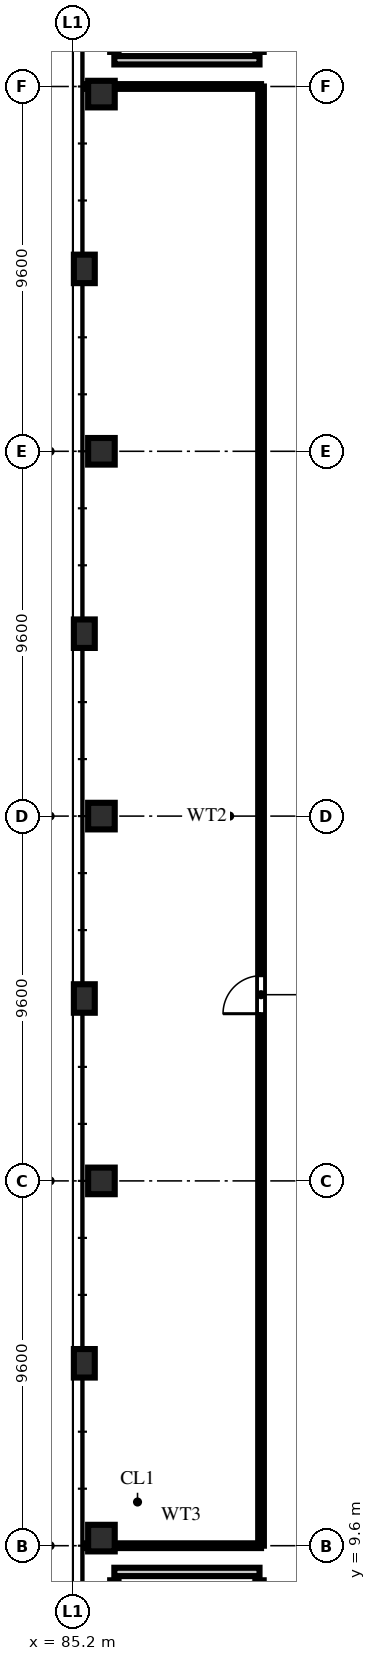
"""IFC4 building model, lengths in metres.
Left out: names, types, materials, properties, quantities, classifications, styles, units other than length and angle.
Written with IfcOpenShell. Run it as: python <this file> out.ifc"""

import sys

from ifc_helpers import new_model, si_unit, direction, frame, frame_2d, origin, origin_2d, place, context, subcontext, project, spatial, rectangle, extrude, element, fill, save


model = new_model("IFC4")
c1 = context("Model", 3, precision=1e-05, world=origin(), true_north=direction((0.0, 1.0)))
c2 = subcontext(c1, "Body", "Model", "MODEL_VIEW")
j1 = project(units=[si_unit("LENGTHUNIT", "METRE"), si_unit("PLANEANGLEUNIT", "RADIAN")], contexts=[c1])
p1 = place(None, origin())
s1 = spatial("IfcSite", under=j1, at=p1, CompositionType="ELEMENT")
p2 = place(p1, origin())
s2 = spatial("IfcBuilding", under=s1, at=p2, CompositionType="ELEMENT")
p3 = place(p2, frame((0.0, 0.0, 5.2)))
s3 = spatial("IfcBuildingStorey", under=s2, at=p3, CompositionType="ELEMENT", Elevation=5.2)
for number, where, z_axis, x_axis in (
    (1, (85.95, 9.8, 0.0), (0.0, 0.0, 1.0), (1.0, 0.0, 0.0)),
    (2, (85.95, 19.2, 0.0), (0.0, 0.0, 1.0), (1.0, 0.0, 0.0)),
    (3, (85.95, 28.8, 0.0), (0.0, 0.0, 1.0), (1.0, 0.0, 0.0)),
    (4, (85.95, 38.4, 0.0), (0.0, 0.0, 1.0), (1.0, 0.0, 0.0)),
    (5, (85.95, 47.8, 0.0), (0.0, 0.0, 1.0), (1.0, 0.0, 0.0)),
):
    element("IfcColumn", number, at=place(p3, frame(where, z_axis=z_axis, x_axis=x_axis)), inside=s3, PredefinedType="COLUMN", context=c2, shape_type="SweptSolid", body=[
        extrude(rectangle(XDim=0.7, YDim=0.7, at=origin_2d()), origin(), (0.0, 0.0, 1.0), 5.2),
    ])
for number, where, z_axis, x_axis in (
    (6, (85.5, 14.4, 0.0), (0.0, 0.0, 1.0), (1.0, 0.0, 0.0)),
    (7, (85.5, 24.0, 0.0), (0.0, 0.0, 1.0), (1.0, 0.0, 0.0)),
    (8, (85.5, 33.6, 0.0), (0.0, 0.0, 1.0), (1.0, 0.0, 0.0)),
    (9, (85.5, 43.2, 0.0), (0.0, 0.0, 1.0), (1.0, 0.0, 0.0)),
):
    element("IfcColumn", number, at=place(p3, frame(where, z_axis=z_axis, x_axis=x_axis)), inside=s3, PredefinedType="PILASTER", context=c2, shape_type="SweptSolid", body=[
        extrude(rectangle(XDim=0.55, YDim=0.75, at=origin_2d()), origin(), (0.0, 0.0, 1.0), 5.2),
    ])
p4 = place(p3, frame((86.29, 1.31, 0.0), z_axis=(0.0, 0.0, 1.0), x_axis=(0.0, 1.0, 0.0)))
e10 = element("IfcWall", 10, at=p4, inside=s3, PredefinedType="SOLIDWALL", context=c2, shape_type="SweptSolid", body=[
    extrude(rectangle(XDim=7.38, YDim=0.22, at=frame_2d((3.69, 0.0))), origin(), (0.0, 0.0, 1.0), 4.85),
])
p5 = place(p3, frame((86.29, 8.91, 0.0), z_axis=(0.0, 0.0, 1.0), x_axis=(1.0, 0.0, 0.0)))
e11 = element("IfcWall", 11, at=p5, inside=s3, PredefinedType="SOLIDWALL", context=c2, shape_type="SweptSolid", body=[
    extrude(rectangle(XDim=3.82, YDim=0.22, at=frame_2d((1.91, 0.0))), origin(), (0.0, 0.0, 1.0), 4.85),
])
p6 = place(p3, frame((90.11, 1.31, 0.0), z_axis=(0.0, 0.0, 1.0), x_axis=(0.0, 1.0, 0.0)))
e12 = element("IfcWall", 12, at=p6, inside=s3, PredefinedType="SOLIDWALL", context=c2, shape_type="SweptSolid", body=[
    extrude(rectangle(XDim=7.38, YDim=0.22, at=frame_2d((3.69, 0.0))), origin(), (0.0, 0.0, 1.0), 4.85),
])
p7 = place(p6, frame((0.14, 0.0, 0.0)))
e13 = element("IfcOpeningElement", 13, at=p7, cuts=e12, PredefinedType="OPENING", context=c2, shape_type="SweptSolid", body=[
    extrude(rectangle(XDim=1.1, YDim=2.2, at=frame_2d((0.55, 1.1))), frame((0.0, 0.122, 0.0), z_axis=(0.0, -1.0, 0.0), x_axis=(1.0, 0.0, 0.0)), (0.0, 0.0, 1.0), 0.244),
])
p8 = place(p3, frame((86.29, 48.91, 0.0), z_axis=(0.0, 0.0, 1.0), x_axis=(0.0, 1.0, 0.0)))
e14 = element("IfcWall", 14, at=p8, inside=s3, PredefinedType="SOLIDWALL", context=c2, shape_type="SweptSolid", body=[
    extrude(rectangle(XDim=7.38, YDim=0.22, at=frame_2d((3.69, 0.0))), origin(), (0.0, 0.0, 1.0), 4.85),
])
p9 = place(p3, frame((86.29, 48.69, 0.0), z_axis=(0.0, 0.0, 1.0), x_axis=(1.0, 0.0, 0.0)))
e15 = element("IfcWall", 15, at=p9, inside=s3, PredefinedType="SOLIDWALL", context=c2, shape_type="SweptSolid", body=[
    extrude(rectangle(XDim=3.82, YDim=0.22, at=frame_2d((1.91, 0.0))), origin(), (0.0, 0.0, 1.0), 4.85),
])
p10 = place(p3, frame((90.11, 48.91, 0.0), z_axis=(0.0, 0.0, 1.0), x_axis=(0.0, 1.0, 0.0)))
e16 = element("IfcWall", 16, at=p10, inside=s3, PredefinedType="SOLIDWALL", context=c2, shape_type="SweptSolid", body=[
    extrude(rectangle(XDim=7.38, YDim=0.22, at=frame_2d((3.69, 0.0))), origin(), (0.0, 0.0, 1.0), 4.85),
])
p11 = place(p10, frame((0.14, 0.0, 0.0)))
e17 = element("IfcOpeningElement", 17, at=p11, cuts=e16, PredefinedType="OPENING", context=c2, shape_type="SweptSolid", body=[
    extrude(rectangle(XDim=1.1, YDim=2.2, at=frame_2d((0.55, 1.1))), frame((0.0, 0.122, 0.0), z_axis=(0.0, -1.0, 0.0), x_axis=(1.0, 0.0, 0.0)), (0.0, 0.0, 1.0), 0.244),
])
p12 = place(p3, frame((85.55, 9.6, 0.0), z_axis=(0.0, 0.0, 1.0), x_axis=(1.0, 0.0, 0.0)))
e18 = element("IfcWall", 18, at=p12, inside=s3, PredefinedType="PARTITIONING", context=c2, shape_type="SweptSolid", body=[
    extrude(rectangle(XDim=0.4, YDim=0.125, at=frame_2d((0.2, 0.0))), origin(), (0.0, 0.0, 1.0), 4.85),
])
p13 = place(p3, frame((85.95, 9.6, 0.0), z_axis=(0.0, 0.0, 1.0), x_axis=(1.0, 0.0, 0.0)))
e19 = element("IfcWall", 19, at=p13, inside=s3, PredefinedType="PARTITIONING", context=c2, shape_type="SweptSolid", body=[
    extrude(rectangle(XDim=4.2, YDim=0.125, at=frame_2d((2.1, 0.0))), origin(), (0.0, 0.0, 1.0), 4.05),
])
p14 = place(p3, frame((85.55, 48.0, 0.0), z_axis=(0.0, 0.0, 1.0), x_axis=(1.0, 0.0, 0.0)))
e20 = element("IfcWall", 20, at=p14, inside=s3, PredefinedType="PARTITIONING", context=c2, shape_type="SweptSolid", body=[
    extrude(rectangle(XDim=0.4, YDim=0.125, at=frame_2d((0.2, 0.0))), origin(), (0.0, 0.0, 1.0), 4.85),
])
p15 = place(p3, frame((85.95, 48.0, 0.0), z_axis=(0.0, 0.0, 1.0), x_axis=(1.0, 0.0, 0.0)))
e21 = element("IfcWall", 21, at=p15, inside=s3, PredefinedType="PARTITIONING", context=c2, shape_type="SweptSolid", body=[
    extrude(rectangle(XDim=4.2, YDim=0.125, at=frame_2d((2.1, 0.0))), origin(), (0.0, 0.0, 1.0), 4.05),
])
p16 = place(p3, frame((90.15, 9.6, 0.0), z_axis=(0.0, 0.0, 1.0), x_axis=(0.0, 1.0, 0.0)))
e22 = element("IfcWall", 22, at=p16, inside=s3, PredefinedType="PARTITIONING", context=c2, shape_type="SweptSolid", body=[
    extrude(rectangle(XDim=38.4, YDim=0.15, at=frame_2d((19.2, 0.0))), origin(), (0.0, 0.0, 1.0), 4.85),
])
p17 = place(p16, frame((14.0, 0.0, 0.0)))
e23 = element("IfcOpeningElement", 23, at=p17, cuts=e22, PredefinedType="OPENING", context=c2, shape_type="SweptSolid", body=[
    extrude(rectangle(XDim=1.0, YDim=2.2, at=frame_2d((0.5, 1.1))), frame((0.0, 0.087, 0.0), z_axis=(0.0, -1.0, 0.0), x_axis=(1.0, 0.0, 0.0)), (0.0, 0.0, 1.0), 0.174),
])
p18 = place(p17, origin())
e24 = element("IfcDoor", 24, at=p18, inside=s3, OperationType="SINGLE_SWING_LEFT", PredefinedType="DOOR", context=c2, shape_type="SweptSolid", body=[
    extrude(rectangle(XDim=1.0, YDim=2.2, at=frame_2d((0.5, 1.1))), frame((0.0, 0.025, 0.0), z_axis=(0.0, -1.0, 0.0), x_axis=(1.0, 0.0, 0.0)), (0.0, 0.0, 1.0), 0.05),
])
fill(e23, e24)
save(model, sys.argv[1])
